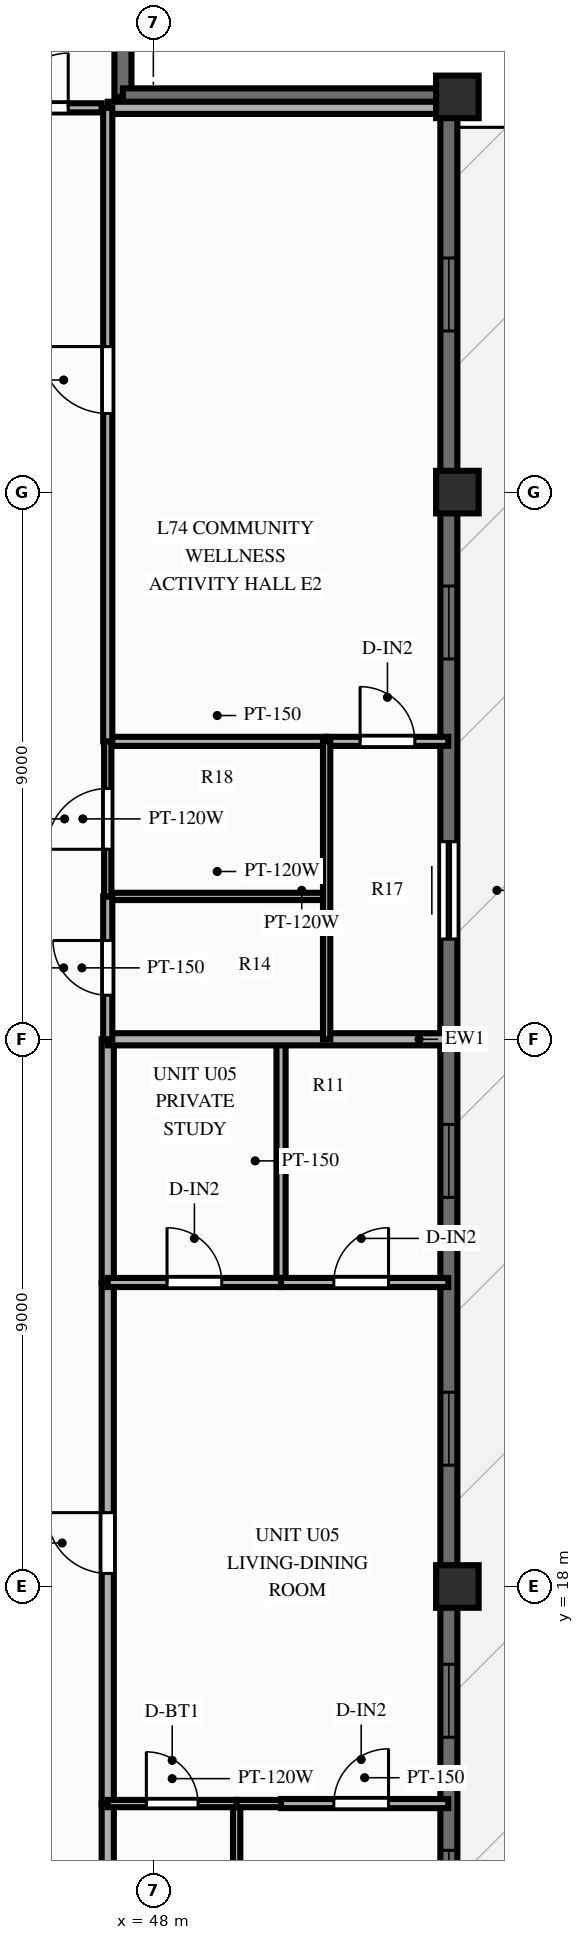
"""IFC4 building model, lengths in metres.
Left out: names, types, materials, properties, quantities, classifications, styles, units other than length and angle.
Written with IfcOpenShell. Run it as: python <this file> out.ifc"""

import sys

from ifc_helpers import new_model, si_unit, direction, frame, frame_2d, origin, origin_2d, place, context, subcontext, project, spatial, rectangle, extrude, source, transform, mapped, element, fill, save


model = new_model("IFC4")
c1 = context("Model", 3, precision=1e-05, world=origin(), true_north=direction((0.0, 1.0)))
c2 = subcontext(c1, "Body", "Model", "MODEL_VIEW")
j1 = project(units=[si_unit("LENGTHUNIT", "METRE"), si_unit("PLANEANGLEUNIT", "RADIAN")], contexts=[c1])
p1 = place(None, origin())
s1 = spatial("IfcSite", under=j1, at=p1, CompositionType="ELEMENT")
p2 = place(p1, origin())
s2 = spatial("IfcBuilding", under=s1, at=p2, CompositionType="ELEMENT")
p3 = place(p2, frame((0.0, 0.0, 240.0)))
s3 = spatial("IfcBuildingStorey", under=s2, at=p3, CompositionType="ELEMENT", Elevation=240.0)
m1 = source(origin(), c2, "Body", "SweptSolid", [
    extrude(rectangle(XDim=0.7, YDim=0.7, at=origin_2d()), origin(), (0.0, 0.0, 1.0), 3.0),
])
for number, where, z_axis, x_axis in (
    (1, (53.0, 18.0, 0.0), (0.0, 0.0, 1.0), (1.0, 0.0, 0.0)),
    (2, (53.0, 36.0, 0.0), (0.0, 0.0, 1.0), (1.0, 0.0, 0.0)),
    (3, (53.0, 42.5, 0.0), (0.0, 0.0, 1.0), (1.0, 0.0, 0.0)),
):
    element("IfcColumn", number, at=place(p3, frame(where, z_axis=z_axis, x_axis=x_axis)), inside=s3, PredefinedType="COLUMN", context=c2, shape_type="MappedRepresentation", body=[
        mapped(m1, transform((0.0, 0.0, 0.0), scale=1.0)),
    ])
p4 = place(p3, frame((52.86, 11.5, 0.0), z_axis=(0.0, 0.0, 1.0), x_axis=(0.0, 1.0, 0.0)))
e4 = element("IfcWall", 4, at=p4, inside=s3, PredefinedType="SOLIDWALL", context=c2, shape_type="SweptSolid", body=[
    extrude(rectangle(XDim=31.0, YDim=0.28, at=frame_2d((15.5, 0.0))), origin(), (0.0, 0.0, 1.0), 2.28),
])
p5 = place(p4, frame((0.96, 0.0, 0.25)))
e5 = element("IfcOpeningElement", 5, at=p5, cuts=e4, PredefinedType="OPENING", context=c2, shape_type="SweptSolid", body=[
    extrude(rectangle(XDim=1.2, YDim=1.5, at=frame_2d((0.6, 0.75))), frame((0.0, 0.152, 0.0), z_axis=(0.0, -1.0, 0.0), x_axis=(1.0, 0.0, 0.0)), (0.0, 0.0, 1.0), 0.304),
])
p6 = place(p4, frame((4.02, 0.0, 0.25)))
e6 = element("IfcOpeningElement", 6, at=p6, cuts=e4, PredefinedType="OPENING", context=c2, shape_type="SweptSolid", body=[
    extrude(rectangle(XDim=1.2, YDim=1.5, at=frame_2d((0.6, 0.75))), frame((0.0, 0.152, 0.0), z_axis=(0.0, -1.0, 0.0), x_axis=(1.0, 0.0, 0.0)), (0.0, 0.0, 1.0), 0.304),
])
p7 = place(p4, frame((8.495, 0.0, 0.25)))
e7 = element("IfcOpeningElement", 7, at=p7, cuts=e4, PredefinedType="OPENING", context=c2, shape_type="SweptSolid", body=[
    extrude(rectangle(XDim=1.2, YDim=1.5, at=frame_2d((0.6, 0.75))), frame((0.0, 0.152, 0.0), z_axis=(0.0, -1.0, 0.0), x_axis=(1.0, 0.0, 0.0)), (0.0, 0.0, 1.0), 0.304),
])
p8 = place(p4, frame((12.9, 0.0, 0.25)))
e8 = element("IfcOpeningElement", 8, at=p8, cuts=e4, PredefinedType="OPENING", context=c2, shape_type="SweptSolid", body=[
    extrude(rectangle(XDim=1.2, YDim=1.5, at=frame_2d((0.6, 0.75))), frame((0.0, 0.152, 0.0), z_axis=(0.0, -1.0, 0.0), x_axis=(1.0, 0.0, 0.0)), (0.0, 0.0, 1.0), 0.304),
])
p9 = place(p4, frame((18.75, 0.0, 0.0), z_axis=(0.0, 0.0, 1.0), x_axis=(-1.0, 0.0, 0.0)))
e9 = element("IfcOpeningElement", 9, at=p9, cuts=e4, PredefinedType="OPENING", context=c2, shape_type="SweptSolid", body=[
    extrude(rectangle(XDim=1.6, YDim=2.15, at=frame_2d((0.8, 1.075))), frame((0.0, 0.152, 0.0), z_axis=(0.0, -1.0, 0.0), x_axis=(1.0, 0.0, 0.0)), (0.0, 0.0, 1.0), 0.304),
])
p10 = place(p4, frame((21.755, 0.0, 0.25)))
e10 = element("IfcOpeningElement", 10, at=p10, cuts=e4, PredefinedType="OPENING", context=c2, shape_type="SweptSolid", body=[
    extrude(rectangle(XDim=1.2, YDim=1.5, at=frame_2d((0.6, 0.75))), frame((0.0, 0.152, 0.0), z_axis=(0.0, -1.0, 0.0), x_axis=(1.0, 0.0, 0.0)), (0.0, 0.0, 1.0), 0.304),
])
p11 = place(p4, frame((27.15, 0.0, 0.25)))
e11 = element("IfcOpeningElement", 11, at=p11, cuts=e4, PredefinedType="OPENING", context=c2, shape_type="SweptSolid", body=[
    extrude(rectangle(XDim=1.2, YDim=1.5, at=frame_2d((0.6, 0.75))), frame((0.0, 0.152, 0.0), z_axis=(0.0, -1.0, 0.0), x_axis=(1.0, 0.0, 0.0)), (0.0, 0.0, 1.0), 0.304),
])
for number, where, z_axis, x_axis in (
    (12, (47.5, 42.5, 0.0), (0.0, 0.0, 1.0), (0.0, 1.0, 0.0)),
    (13, (47.5, 42.5, 0.0), (0.0, 0.0, 1.0), (1.0, 0.0, 0.0)),
):
    element("IfcWall", number, at=place(p3, frame(where, z_axis=z_axis, x_axis=x_axis)), inside=s3, PredefinedType="SOLIDWALL", context=c2, shape_type="SweptSolid", body=[
        extrude(rectangle(XDim=5.42, YDim=0.28, at=frame_2d((2.71, 0.0))), origin(), (0.0, 0.0, 1.0), 2.28),
    ])
p12 = place(p3, frame((44.82, 42.32, 0.0), z_axis=(0.0, 0.0, 1.0), x_axis=(1.0, 0.0, 0.0)))
e14 = element("IfcWall", 14, at=p12, inside=s3, PredefinedType="PARTITIONING", context=c2, shape_type="SweptSolid", body=[
    extrude(rectangle(XDim=2.33, YDim=0.15, at=frame_2d((1.165, 0.0))), origin(), (0.0, 0.0, 1.0), 2.79),
])
p13 = place(p12, frame((0.88, 0.0, 0.0)))
e15 = element("IfcOpeningElement", 15, at=p13, cuts=e14, PredefinedType="OPENING", context=c2, shape_type="SweptSolid", body=[
    extrude(rectangle(XDim=0.9, YDim=2.1, at=frame_2d((0.45, 1.05))), frame((0.0, 0.087, 0.0), z_axis=(0.0, -1.0, 0.0), x_axis=(1.0, 0.0, 0.0)), (0.0, 0.0, 1.0), 0.174),
])
p14 = place(p3, frame((47.25, 42.32, 0.0), z_axis=(0.0, 0.0, 1.0), x_axis=(1.0, 0.0, 0.0)))
e16 = element("IfcWall", 16, at=p14, inside=s3, PredefinedType="PARTITIONING", context=c2, shape_type="SweptSolid", body=[
    extrude(rectangle(XDim=5.6, YDim=0.2, at=frame_2d((2.8, 0.0))), origin(), (0.0, 0.0, 1.0), 2.79),
])
p15 = place(p3, frame((47.25, 11.68, 0.0), z_axis=(0.0, 0.0, 1.0), x_axis=(0.0, 1.0, 0.0)))
e17 = element("IfcWall", 17, at=p15, inside=s3, PredefinedType="PARTITIONING", context=c2, shape_type="SweptSolid", body=[
    extrude(rectangle(XDim=2.75, YDim=0.2, at=frame_2d((1.375, 0.0))), origin(), (0.0, 0.0, 1.0), 2.79),
])
p16 = place(p3, frame((47.25, 14.43, 0.0), z_axis=(0.0, 0.0, 1.0), x_axis=(0.0, 1.0, 0.0)))
e18 = element("IfcWall", 18, at=p16, inside=s3, PredefinedType="PARTITIONING", context=c2, shape_type="SweptSolid", body=[
    extrude(rectangle(XDim=8.57, YDim=0.2, at=frame_2d((4.285, 0.0))), origin(), (0.0, 0.0, 1.0), 2.79),
])
p17 = place(p16, frame((3.785, 0.0, 0.0)))
e19 = element("IfcOpeningElement", 19, at=p17, cuts=e18, PredefinedType="OPENING", context=c2, shape_type="SweptSolid", body=[
    extrude(rectangle(XDim=1.0, YDim=2.15, at=frame_2d((0.5, 1.075))), frame((0.0, 0.112, 0.0), z_axis=(0.0, -1.0, 0.0), x_axis=(1.0, 0.0, 0.0)), (0.0, 0.0, 1.0), 0.224),
])
p18 = place(p3, frame((47.25, 23.0, 0.0), z_axis=(0.0, 0.0, 1.0), x_axis=(0.0, 1.0, 0.0)))
e20 = element("IfcWall", 20, at=p18, inside=s3, PredefinedType="PARTITIONING", context=c2, shape_type="SweptSolid", body=[
    extrude(rectangle(XDim=4.0, YDim=0.2, at=frame_2d((2.0, 0.0))), origin(), (0.0, 0.0, 1.0), 2.79),
])
p19 = place(p3, frame((49.37, 11.68, 0.0), z_axis=(0.0, 0.0, 1.0), x_axis=(0.0, 1.0, 0.0)))
e21 = element("IfcWall", 21, at=p19, inside=s3, PredefinedType="PARTITIONING", context=c2, shape_type="SweptSolid", body=[
    extrude(rectangle(XDim=2.75, YDim=0.12, at=frame_2d((1.375, 0.0))), origin(), (0.0, 0.0, 1.0), 2.79),
])
p20 = place(p3, frame((50.1, 23.0, 0.0), z_axis=(0.0, 0.0, 1.0), x_axis=(0.0, 1.0, 0.0)))
e22 = element("IfcWall", 22, at=p20, inside=s3, PredefinedType="PARTITIONING", context=c2, shape_type="SweptSolid", body=[
    extrude(rectangle(XDim=4.0, YDim=0.15, at=frame_2d((2.0, 0.0))), origin(), (0.0, 0.0, 1.0), 2.79),
])
p21 = place(p3, frame((47.25, 14.43, 0.0), z_axis=(0.0, 0.0, 1.0), x_axis=(1.0, 0.0, 0.0)))
e23 = element("IfcWall", 23, at=p21, inside=s3, PredefinedType="PARTITIONING", context=c2, shape_type="SweptSolid", body=[
    extrude(rectangle(XDim=2.12, YDim=0.12, at=frame_2d((1.06, 0.0))), origin(), (0.0, 0.0, 1.0), 2.79),
])
p22 = place(p21, frame((0.635, 0.0, 0.0)))
e24 = element("IfcOpeningElement", 24, at=p22, cuts=e23, PredefinedType="OPENING", context=c2, shape_type="SweptSolid", body=[
    extrude(rectangle(XDim=0.85, YDim=2.05, at=frame_2d((0.425, 1.025))), frame((0.0, 0.072, 0.0), z_axis=(0.0, -1.0, 0.0), x_axis=(1.0, 0.0, 0.0)), (0.0, 0.0, 1.0), 0.144),
])
p23 = place(p3, frame((49.37, 14.43, 0.0), z_axis=(0.0, 0.0, 1.0), x_axis=(1.0, 0.0, 0.0)))
e25 = element("IfcWall", 25, at=p23, inside=s3, PredefinedType="PARTITIONING", context=c2, shape_type="SweptSolid", body=[
    extrude(rectangle(XDim=0.73, YDim=0.12, at=frame_2d((0.365, 0.0))), origin(), (0.0, 0.0, 1.0), 2.79),
])
p24 = place(p3, frame((50.1, 14.43, 0.0), z_axis=(0.0, 0.0, 1.0), x_axis=(1.0, 0.0, 0.0)))
e26 = element("IfcWall", 26, at=p24, inside=s3, PredefinedType="PARTITIONING", context=c2, shape_type="SweptSolid", body=[
    extrude(rectangle(XDim=2.75, YDim=0.15, at=frame_2d((1.375, 0.0))), origin(), (0.0, 0.0, 1.0), 2.79),
])
p25 = place(p24, frame((0.868, 0.0, 0.0)))
e27 = element("IfcOpeningElement", 27, at=p25, cuts=e26, PredefinedType="OPENING", context=c2, shape_type="SweptSolid", body=[
    extrude(rectangle(XDim=0.9, YDim=2.1, at=frame_2d((0.45, 1.05))), frame((0.0, 0.087, 0.0), z_axis=(0.0, -1.0, 0.0), x_axis=(1.0, 0.0, 0.0)), (0.0, 0.0, 1.0), 0.174),
])
p26 = place(p3, frame((47.25, 23.0, 0.0), z_axis=(0.0, 0.0, 1.0), x_axis=(1.0, 0.0, 0.0)))
e28 = element("IfcWall", 28, at=p26, inside=s3, PredefinedType="PARTITIONING", context=c2, shape_type="SweptSolid", body=[
    extrude(rectangle(XDim=2.85, YDim=0.15, at=frame_2d((1.425, 0.0))), origin(), (0.0, 0.0, 1.0), 2.79),
])
p27 = place(p26, frame((0.975, 0.0, 0.0)))
e29 = element("IfcOpeningElement", 29, at=p27, cuts=e28, PredefinedType="OPENING", context=c2, shape_type="SweptSolid", body=[
    extrude(rectangle(XDim=0.9, YDim=2.1, at=frame_2d((0.45, 1.05))), frame((0.0, 0.087, 0.0), z_axis=(0.0, -1.0, 0.0), x_axis=(1.0, 0.0, 0.0)), (0.0, 0.0, 1.0), 0.174),
])
p28 = place(p3, frame((50.1, 23.0, 0.0), z_axis=(0.0, 0.0, 1.0), x_axis=(1.0, 0.0, 0.0)))
e30 = element("IfcWall", 30, at=p28, inside=s3, PredefinedType="PARTITIONING", context=c2, shape_type="SweptSolid", body=[
    extrude(rectangle(XDim=2.75, YDim=0.15, at=frame_2d((1.375, 0.0))), origin(), (0.0, 0.0, 1.0), 2.79),
])
p29 = place(p28, frame((0.868, 0.0, 0.0)))
e31 = element("IfcOpeningElement", 31, at=p29, cuts=e30, PredefinedType="OPENING", context=c2, shape_type="SweptSolid", body=[
    extrude(rectangle(XDim=0.9, YDim=2.1, at=frame_2d((0.45, 1.05))), frame((0.0, 0.087, 0.0), z_axis=(0.0, -1.0, 0.0), x_axis=(1.0, 0.0, 0.0)), (0.0, 0.0, 1.0), 0.174),
])
p30 = place(p3, frame((47.25, 27.0, 0.0), z_axis=(0.0, 0.0, 1.0), x_axis=(1.0, 0.0, 0.0)))
e32 = element("IfcWall", 32, at=p30, inside=s3, PredefinedType="PARTITIONING", context=c2, shape_type="SweptSolid", body=[
    extrude(rectangle(XDim=5.6, YDim=0.2, at=frame_2d((2.8, 0.0))), origin(), (0.0, 0.0, 1.0), 2.79),
])
p31 = place(p3, frame((47.25, 29.35, 0.0), z_axis=(0.0, 0.0, 1.0), x_axis=(1.0, 0.0, 0.0)))
e33 = element("IfcWall", 33, at=p31, inside=s3, PredefinedType="PARTITIONING", context=c2, shape_type="SweptSolid", body=[
    extrude(rectangle(XDim=3.6, YDim=0.12, at=frame_2d((1.8, 0.0))), origin(), (0.0, 0.0, 1.0), 2.79),
])
p32 = place(p3, frame((47.25, 31.9, 0.0), z_axis=(0.0, 0.0, 1.0), x_axis=(1.0, 0.0, 0.0)))
e34 = element("IfcWall", 34, at=p32, inside=s3, PredefinedType="PARTITIONING", context=c2, shape_type="SweptSolid", body=[
    extrude(rectangle(XDim=3.6, YDim=0.15, at=frame_2d((1.8, 0.0))), origin(), (0.0, 0.0, 1.0), 2.39),
])
p33 = place(p3, frame((50.85, 31.9, 0.0), z_axis=(0.0, 0.0, 1.0), x_axis=(1.0, 0.0, 0.0)))
e35 = element("IfcWall", 35, at=p33, inside=s3, PredefinedType="PARTITIONING", context=c2, shape_type="SweptSolid", body=[
    extrude(rectangle(XDim=2.0, YDim=0.15, at=frame_2d((1.0, 0.0))), origin(), (0.0, 0.0, 1.0), 2.39),
])
p34 = place(p33, frame((0.55, 0.0, 0.0)))
e36 = element("IfcOpeningElement", 36, at=p34, cuts=e35, PredefinedType="OPENING", context=c2, shape_type="SweptSolid", body=[
    extrude(rectangle(XDim=0.9, YDim=2.1, at=frame_2d((0.45, 1.05))), frame((0.0, 0.087, 0.0), z_axis=(0.0, -1.0, 0.0), x_axis=(1.0, 0.0, 0.0)), (0.0, 0.0, 1.0), 0.174),
])
p35 = place(p3, frame((50.85, 27.0, 0.0), z_axis=(0.0, 0.0, 1.0), x_axis=(0.0, 1.0, 0.0)))
e37 = element("IfcWall", 37, at=p35, inside=s3, PredefinedType="PARTITIONING", context=c2, shape_type="SweptSolid", body=[
    extrude(rectangle(XDim=4.9, YDim=0.12, at=frame_2d((2.45, 0.0))), origin(), (0.0, 0.0, 1.0), 2.79),
])
p36 = place(p3, frame((47.25, 27.0, 0.0), z_axis=(0.0, 0.0, 1.0), x_axis=(0.0, 1.0, 0.0)))
e38 = element("IfcWall", 38, at=p36, inside=s3, PredefinedType="PARTITIONING", context=c2, shape_type="SweptSolid", body=[
    extrude(rectangle(XDim=2.35, YDim=0.15, at=frame_2d((1.175, 0.0))), origin(), (0.0, 0.0, 1.0), 2.79),
])
p37 = place(p36, frame((0.725, 0.0, 0.0)))
e39 = element("IfcOpeningElement", 39, at=p37, cuts=e38, PredefinedType="OPENING", context=c2, shape_type="SweptSolid", body=[
    extrude(rectangle(XDim=0.9, YDim=2.1, at=frame_2d((0.45, 1.05))), frame((0.0, 0.087, 0.0), z_axis=(0.0, -1.0, 0.0), x_axis=(1.0, 0.0, 0.0)), (0.0, 0.0, 1.0), 0.174),
])
p38 = place(p3, frame((47.25, 29.35, 0.0), z_axis=(0.0, 0.0, 1.0), x_axis=(0.0, 1.0, 0.0)))
e40 = element("IfcWall", 40, at=p38, inside=s3, PredefinedType="PARTITIONING", context=c2, shape_type="SweptSolid", body=[
    extrude(rectangle(XDim=2.55, YDim=0.12, at=frame_2d((1.275, 0.0))), origin(), (0.0, 0.0, 1.0), 2.79),
])
p39 = place(p38, frame((0.775, 0.0, 0.0)))
e41 = element("IfcOpeningElement", 41, at=p39, cuts=e40, PredefinedType="OPENING", context=c2, shape_type="SweptSolid", body=[
    extrude(rectangle(XDim=1.0, YDim=2.1, at=frame_2d((0.5, 1.05))), frame((0.0, 0.072, 0.0), z_axis=(0.0, -1.0, 0.0), x_axis=(1.0, 0.0, 0.0)), (0.0, 0.0, 1.0), 0.144),
])
p40 = place(p3, frame((47.25, 31.9, 0.0), z_axis=(0.0, 0.0, 1.0), x_axis=(0.0, 1.0, 0.0)))
e42 = element("IfcWall", 42, at=p40, inside=s3, PredefinedType="PARTITIONING", context=c2, shape_type="SweptSolid", body=[
    extrude(rectangle(XDim=10.42, YDim=0.15, at=frame_2d((5.21, 0.0))), origin(), (0.0, 0.0, 1.0), 2.79),
])
p41 = place(p40, frame((5.393, 0.0, 0.0)))
e43 = element("IfcOpeningElement", 43, at=p41, cuts=e42, PredefinedType="OPENING", context=c2, shape_type="SweptSolid", body=[
    extrude(rectangle(XDim=1.1, YDim=2.15, at=frame_2d((0.55, 1.075))), frame((0.0, 0.087, 0.0), z_axis=(0.0, -1.0, 0.0), x_axis=(1.0, 0.0, 0.0)), (0.0, 0.0, 1.0), 0.174),
])
m2 = source(origin(), c2, "Body", "SweptSolid", [
    extrude(rectangle(XDim=1.2, YDim=1.5, at=frame_2d((0.6, 0.75))), frame((0.0, 0.03, 0.0), z_axis=(0.0, -1.0, 0.0), x_axis=(1.0, 0.0, 0.0)), (0.0, 0.0, 1.0), 0.06),
])
p42 = place(p5, origin())
e44 = element("IfcWindow", 44, at=p42, inside=s3, PartitioningType="SINGLE_PANEL", PredefinedType="WINDOW", context=c2, shape_type="MappedRepresentation", body=[
    mapped(m2, transform((0.0, 0.0, 0.0), scale=1.0)),
])
fill(e5, e44)
p43 = place(p6, origin())
e45 = element("IfcWindow", 45, at=p43, inside=s3, PartitioningType="SINGLE_PANEL", PredefinedType="WINDOW", context=c2, shape_type="MappedRepresentation", body=[
    mapped(m2, transform((0.0, 0.0, 0.0), scale=1.0)),
])
fill(e6, e45)
p44 = place(p7, origin())
e46 = element("IfcWindow", 46, at=p44, inside=s3, PartitioningType="SINGLE_PANEL", PredefinedType="WINDOW", context=c2, shape_type="MappedRepresentation", body=[
    mapped(m2, transform((0.0, 0.0, 0.0), scale=1.0)),
])
fill(e7, e46)
p45 = place(p8, origin())
e47 = element("IfcWindow", 47, at=p45, inside=s3, PartitioningType="SINGLE_PANEL", PredefinedType="WINDOW", context=c2, shape_type="MappedRepresentation", body=[
    mapped(m2, transform((0.0, 0.0, 0.0), scale=1.0)),
])
fill(e8, e47)
m3 = source(origin(), c2, "Body", "SweptSolid", [
    extrude(rectangle(XDim=1.6, YDim=2.15, at=frame_2d((0.8, 1.075))), frame((0.0, 0.025, 0.0), z_axis=(0.0, -1.0, 0.0), x_axis=(1.0, 0.0, 0.0)), (0.0, 0.0, 1.0), 0.05),
])
p46 = place(p9, origin())
e48 = element("IfcDoor", 48, at=p46, inside=s3, OperationType="SLIDING_TO_LEFT", PredefinedType="DOOR", context=c2, shape_type="MappedRepresentation", body=[
    mapped(m3, transform((0.0, 0.0, 0.0), scale=1.0)),
])
fill(e9, e48)
p47 = place(p10, origin())
e49 = element("IfcWindow", 49, at=p47, inside=s3, PartitioningType="SINGLE_PANEL", PredefinedType="WINDOW", context=c2, shape_type="MappedRepresentation", body=[
    mapped(m2, transform((0.0, 0.0, 0.0), scale=1.0)),
])
fill(e10, e49)
p48 = place(p11, origin())
e50 = element("IfcWindow", 50, at=p48, inside=s3, PartitioningType="SINGLE_PANEL", PredefinedType="WINDOW", context=c2, shape_type="MappedRepresentation", body=[
    mapped(m2, transform((0.0, 0.0, 0.0), scale=1.0)),
])
fill(e11, e50)
m4 = source(origin(), c2, "Body", "SweptSolid", [
    extrude(rectangle(XDim=0.9, YDim=2.1, at=frame_2d((0.45, 1.05))), frame((0.0, 0.025, 0.0), z_axis=(0.0, -1.0, 0.0), x_axis=(1.0, 0.0, 0.0)), (0.0, 0.0, 1.0), 0.05),
])
p49 = place(p13, origin())
e51 = element("IfcDoor", 51, at=p49, inside=s3, OperationType="SINGLE_SWING_RIGHT", PredefinedType="DOOR", context=c2, shape_type="MappedRepresentation", body=[
    mapped(m4, transform((0.0, 0.0, 0.0), scale=1.0)),
])
fill(e15, e51)
m5 = source(origin(), c2, "Body", "SweptSolid", [
    extrude(rectangle(XDim=1.0, YDim=2.15, at=frame_2d((0.5, 1.075))), frame((0.0, 0.025, 0.0), z_axis=(0.0, -1.0, 0.0), x_axis=(1.0, 0.0, 0.0)), (0.0, 0.0, 1.0), 0.05),
])
p50 = place(p17, origin())
e52 = element("IfcDoor", 52, at=p50, inside=s3, OperationType="SINGLE_SWING_RIGHT", PredefinedType="DOOR", context=c2, shape_type="MappedRepresentation", body=[
    mapped(m5, transform((0.0, 0.0, 0.0), scale=1.0)),
])
fill(e19, e52)
m6 = source(origin(), c2, "Body", "SweptSolid", [
    extrude(rectangle(XDim=0.85, YDim=2.05, at=frame_2d((0.425, 1.025))), frame((0.0, 0.025, 0.0), z_axis=(0.0, -1.0, 0.0), x_axis=(1.0, 0.0, 0.0)), (0.0, 0.0, 1.0), 0.05),
])
p51 = place(p22, origin())
e53 = element("IfcDoor", 53, at=p51, inside=s3, OperationType="SINGLE_SWING_LEFT", PredefinedType="DOOR", context=c2, shape_type="MappedRepresentation", body=[
    mapped(m6, transform((0.0, 0.0, 0.0), scale=1.0)),
])
fill(e24, e53)
p52 = place(p25, origin())
e54 = element("IfcDoor", 54, at=p52, inside=s3, OperationType="SINGLE_SWING_RIGHT", PredefinedType="DOOR", context=c2, shape_type="MappedRepresentation", body=[
    mapped(m4, transform((0.0, 0.0, 0.0), scale=1.0)),
])
fill(e27, e54)
p53 = place(p27, origin())
e55 = element("IfcDoor", 55, at=p53, inside=s3, OperationType="SINGLE_SWING_LEFT", PredefinedType="DOOR", context=c2, shape_type="MappedRepresentation", body=[
    mapped(m4, transform((0.0, 0.0, 0.0), scale=1.0)),
])
fill(e29, e55)
p54 = place(p29, origin())
e56 = element("IfcDoor", 56, at=p54, inside=s3, OperationType="SINGLE_SWING_RIGHT", PredefinedType="DOOR", context=c2, shape_type="MappedRepresentation", body=[
    mapped(m4, transform((0.0, 0.0, 0.0), scale=1.0)),
])
fill(e31, e56)
p55 = place(p34, origin())
e57 = element("IfcDoor", 57, at=p55, inside=s3, OperationType="SINGLE_SWING_LEFT", PredefinedType="DOOR", context=c2, shape_type="MappedRepresentation", body=[
    mapped(m4, transform((0.0, 0.0, 0.0), scale=1.0)),
])
fill(e36, e57)
p56 = place(p37, origin())
e58 = element("IfcDoor", 58, at=p56, inside=s3, OperationType="SINGLE_SWING_RIGHT", PredefinedType="DOOR", context=c2, shape_type="MappedRepresentation", body=[
    mapped(m4, transform((0.0, 0.0, 0.0), scale=1.0)),
])
fill(e39, e58)
m7 = source(origin(), c2, "Body", "SweptSolid", [
    extrude(rectangle(XDim=1.0, YDim=2.1, at=frame_2d((0.5, 1.05))), frame((0.0, 0.025, 0.0), z_axis=(0.0, -1.0, 0.0), x_axis=(1.0, 0.0, 0.0)), (0.0, 0.0, 1.0), 0.05),
])
p57 = place(p39, origin())
e59 = element("IfcDoor", 59, at=p57, inside=s3, OperationType="SINGLE_SWING_LEFT", PredefinedType="DOOR", context=c2, shape_type="MappedRepresentation", body=[
    mapped(m7, transform((0.0, 0.0, 0.0), scale=1.0)),
])
fill(e41, e59)
m8 = source(origin(), c2, "Body", "SweptSolid", [
    extrude(rectangle(XDim=1.1, YDim=2.15, at=frame_2d((0.55, 1.075))), frame((0.0, 0.025, 0.0), z_axis=(0.0, -1.0, 0.0), x_axis=(1.0, 0.0, 0.0)), (0.0, 0.0, 1.0), 0.05),
])
p58 = place(p41, origin())
e60 = element("IfcDoor", 60, at=p58, inside=s3, OperationType="SINGLE_SWING_RIGHT", PredefinedType="DOOR", context=c2, shape_type="MappedRepresentation", body=[
    mapped(m8, transform((0.0, 0.0, 0.0), scale=1.0)),
])
fill(e43, e60)
save(model, sys.argv[1])
